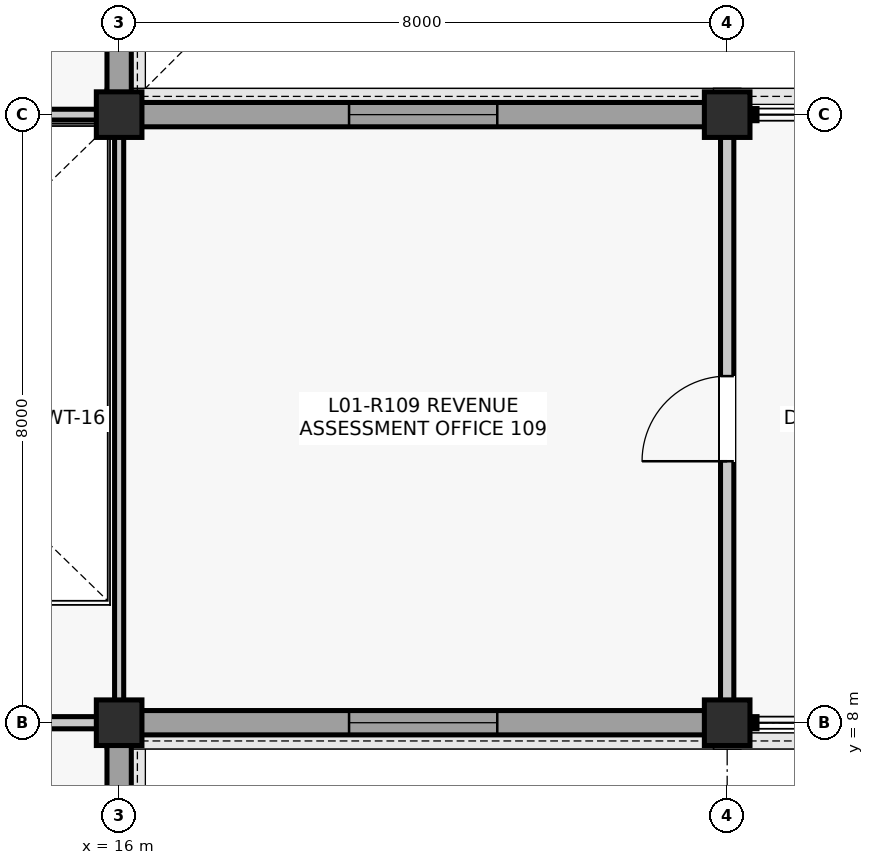
"""IFC4 building model, lengths in metres.
Left out: names, types, materials, properties, quantities, classifications, styles, units other than length and angle.
Written with IfcOpenShell. Run it as: python <this file> out.ifc"""

import sys

from ifc_helpers import new_model, si_unit, direction, frame, frame_2d, origin, origin_2d, place, context, subcontext, project, spatial, rectangle, extrude, element, fill, save


model = new_model("IFC4")
c1 = context("Model", 3, precision=1e-05, world=origin(), true_north=direction((0.0, 1.0)))
c2 = subcontext(c1, "Body", "Model", "MODEL_VIEW")
j1 = project(units=[si_unit("LENGTHUNIT", "METRE"), si_unit("PLANEANGLEUNIT", "RADIAN")], contexts=[c1])
p1 = place(None, origin())
s1 = spatial("IfcSite", under=j1, at=p1, CompositionType="ELEMENT")
p2 = place(p1, origin())
s2 = spatial("IfcBuilding", under=s1, at=p2, CompositionType="ELEMENT")
p3 = place(p2, frame((0.0, 0.0, 5.28)))
s3 = spatial("IfcBuildingStorey", under=s2, at=p3, CompositionType="ELEMENT", Elevation=5.28)
for number, where, z_axis, x_axis in (
    (1, (16.0, 8.0, 0.0), (0.0, 0.0, 1.0), (1.0, 0.0, 0.0)),
    (2, (16.0, 16.0, 0.0), (0.0, 0.0, 1.0), (1.0, 0.0, 0.0)),
    (3, (24.0, 8.0, 0.0), (0.0, 0.0, 1.0), (1.0, 0.0, 0.0)),
    (4, (24.0, 16.0, 0.0), (0.0, 0.0, 1.0), (1.0, 0.0, 0.0)),
):
    element("IfcColumn", number, at=place(p3, frame(where, z_axis=z_axis, x_axis=x_axis)), inside=s3, PredefinedType="COLUMN", context=c2, shape_type="SweptSolid", body=[
        extrude(rectangle(XDim=0.6, YDim=0.6, at=origin_2d()), origin(), (0.0, 0.0, 1.0), 4.62),
    ])
p4 = place(p3, frame((16.0, 0.285, 0.0), z_axis=(0.0, 0.0, 1.0), x_axis=(0.0, 1.0, 0.0)))
e5 = element("IfcWall", 5, at=p4, inside=s3, PredefinedType="SOLIDWALL", context=c2, shape_type="SweptSolid", body=[
    extrude(rectangle(XDim=7.43, YDim=0.32, at=frame_2d((3.715, 0.0))), origin(), (0.0, 0.0, 1.0), 3.977),
])
p5 = place(p4, frame((3.24, 0.0, 1.35)))
e6 = element("IfcOpeningElement", 6, at=p5, cuts=e5, PredefinedType="OPENING", context=c2, shape_type="SweptSolid", body=[
    extrude(rectangle(XDim=0.95, YDim=1.4, at=frame_2d((0.475, 0.7))), frame((0.0, 0.17, 0.0), z_axis=(0.0, -1.0, 0.0), x_axis=(1.0, 0.0, 0.0)), (0.0, 0.0, 1.0), 0.34),
])
p6 = place(p3, frame((16.0, 16.285, 0.0), z_axis=(0.0, 0.0, 1.0), x_axis=(0.0, 1.0, 0.0)))
e7 = element("IfcWall", 7, at=p6, inside=s3, PredefinedType="SOLIDWALL", context=c2, shape_type="SweptSolid", body=[
    extrude(rectangle(XDim=7.43, YDim=0.32, at=frame_2d((3.715, 0.0))), origin(), (0.0, 0.0, 1.0), 3.974),
])
p7 = place(p6, frame((2.74, 0.0, 0.9)))
e8 = element("IfcOpeningElement", 8, at=p7, cuts=e7, PredefinedType="OPENING", context=c2, shape_type="SweptSolid", body=[
    extrude(rectangle(XDim=1.95, YDim=2.45, at=frame_2d((0.975, 1.225))), frame((0.0, 0.17, 0.0), z_axis=(0.0, -1.0, 0.0), x_axis=(1.0, 0.0, 0.0)), (0.0, 0.0, 1.0), 0.34),
])
p8 = place(p3, frame((16.285, 8.0, 0.0), z_axis=(0.0, 0.0, 1.0), x_axis=(1.0, 0.0, 0.0)))
e9 = element("IfcWall", 9, at=p8, inside=s3, PredefinedType="SOLIDWALL", context=c2, shape_type="SweptSolid", body=[
    extrude(rectangle(XDim=7.43, YDim=0.32, at=frame_2d((3.715, 0.0))), origin(), (0.0, 0.0, 1.0), 3.91),
])
p9 = place(p8, frame((2.74, 0.0, 0.9)))
e10 = element("IfcOpeningElement", 10, at=p9, cuts=e9, PredefinedType="OPENING", context=c2, shape_type="SweptSolid", body=[
    extrude(rectangle(XDim=1.95, YDim=2.45, at=frame_2d((0.975, 1.225))), frame((0.0, 0.17, 0.0), z_axis=(0.0, -1.0, 0.0), x_axis=(1.0, 0.0, 0.0)), (0.0, 0.0, 1.0), 0.34),
])
p10 = place(p3, frame((16.285, 16.0, 0.0), z_axis=(0.0, 0.0, 1.0), x_axis=(1.0, 0.0, 0.0)))
e11 = element("IfcWall", 11, at=p10, inside=s3, PredefinedType="SOLIDWALL", context=c2, shape_type="SweptSolid", body=[
    extrude(rectangle(XDim=7.43, YDim=0.32, at=frame_2d((3.715, 0.0))), origin(), (0.0, 0.0, 1.0), 3.974),
])
p11 = place(p10, frame((2.74, 0.0, 0.9)))
e12 = element("IfcOpeningElement", 12, at=p11, cuts=e11, PredefinedType="OPENING", context=c2, shape_type="SweptSolid", body=[
    extrude(rectangle(XDim=1.95, YDim=2.45, at=frame_2d((0.975, 1.225))), frame((0.0, 0.17, 0.0), z_axis=(0.0, -1.0, 0.0), x_axis=(1.0, 0.0, 0.0)), (0.0, 0.0, 1.0), 0.34),
])
p12 = place(p3, frame((8.29, 8.0, 0.0), z_axis=(0.0, 0.0, 1.0), x_axis=(1.0, 0.0, 0.0)))
e13 = element("IfcWall", 13, at=p12, inside=s3, PredefinedType="PARTITIONING", context=c2, shape_type="SweptSolid", body=[
    extrude(rectangle(XDim=7.42, YDim=0.16, at=frame_2d((3.71, 0.0))), origin(), (0.0, 0.0, 1.0), 3.771),
])
p13 = place(p3, frame((16.0, 8.29, 0.0), z_axis=(0.0, 0.0, 1.0), x_axis=(0.0, 1.0, 0.0)))
e14 = element("IfcWall", 14, at=p13, inside=s3, PredefinedType="PARTITIONING", context=c2, shape_type="SweptSolid", body=[
    extrude(rectangle(XDim=7.42, YDim=0.12, at=frame_2d((3.71, 0.0))), origin(), (0.0, 0.0, 1.0), 3.851),
])
p14 = place(p3, frame((8.39, 16.0, 0.0), z_axis=(0.0, 0.0, 1.0), x_axis=(1.0, 0.0, 0.0)))
e15 = element("IfcWall", 15, at=p14, inside=s3, PredefinedType="PARTITIONING", context=c2, shape_type="SweptSolid", body=[
    extrude(rectangle(XDim=7.32, YDim=0.142, at=frame_2d((3.66, 0.0))), origin(), (0.0, 0.0, 1.0), 3.781),
])
p15 = place(p3, frame((24.0, 8.29, 0.0), z_axis=(0.0, 0.0, 1.0), x_axis=(0.0, 1.0, 0.0)))
e16 = element("IfcWall", 16, at=p15, inside=s3, PredefinedType="PARTITIONING", context=c2, shape_type="SweptSolid", body=[
    extrude(rectangle(XDim=7.42, YDim=0.175, at=frame_2d((3.71, 0.0))), origin(), (0.0, 0.0, 1.0), 3.787),
])
p16 = place(p15, frame((3.15, 0.0, 0.0)))
e17 = element("IfcOpeningElement", 17, at=p16, cuts=e16, PredefinedType="OPENING", context=c2, shape_type="SweptSolid", body=[
    extrude(rectangle(XDim=1.12, YDim=2.22, at=frame_2d((0.56, 1.11))), frame((0.0, 0.097, 0.0), z_axis=(0.0, -1.0, 0.0), x_axis=(1.0, 0.0, 0.0)), (0.0, 0.0, 1.0), 0.195),
])
p17 = place(p9, origin())
e18 = element("IfcWindow", 18, at=p17, inside=s3, PartitioningType="SINGLE_PANEL", PredefinedType="WINDOW", context=c2, shape_type="SweptSolid", body=[
    extrude(rectangle(XDim=1.95, YDim=2.45, at=frame_2d((0.975, 1.225))), frame((0.0, 0.03, 0.0), z_axis=(0.0, -1.0, 0.0), x_axis=(1.0, 0.0, 0.0)), (0.0, 0.0, 1.0), 0.06),
])
fill(e10, e18)
p18 = place(p11, origin())
e19 = element("IfcWindow", 19, at=p18, inside=s3, PartitioningType="SINGLE_PANEL", PredefinedType="WINDOW", context=c2, shape_type="SweptSolid", body=[
    extrude(rectangle(XDim=1.95, YDim=2.45, at=frame_2d((0.975, 1.225))), frame((0.0, 0.03, 0.0), z_axis=(0.0, -1.0, 0.0), x_axis=(1.0, 0.0, 0.0)), (0.0, 0.0, 1.0), 0.06),
])
fill(e12, e19)
p19 = place(p16, origin())
e20 = element("IfcDoor", 20, at=p19, inside=s3, OperationType="SINGLE_SWING_LEFT", PredefinedType="DOOR", context=c2, shape_type="SweptSolid", body=[
    extrude(rectangle(XDim=1.12, YDim=2.22, at=frame_2d((0.56, 1.11))), frame((0.0, 0.025, 0.0), z_axis=(0.0, -1.0, 0.0), x_axis=(1.0, 0.0, 0.0)), (0.0, 0.0, 1.0), 0.05),
])
fill(e17, e20)
save(model, sys.argv[1])
